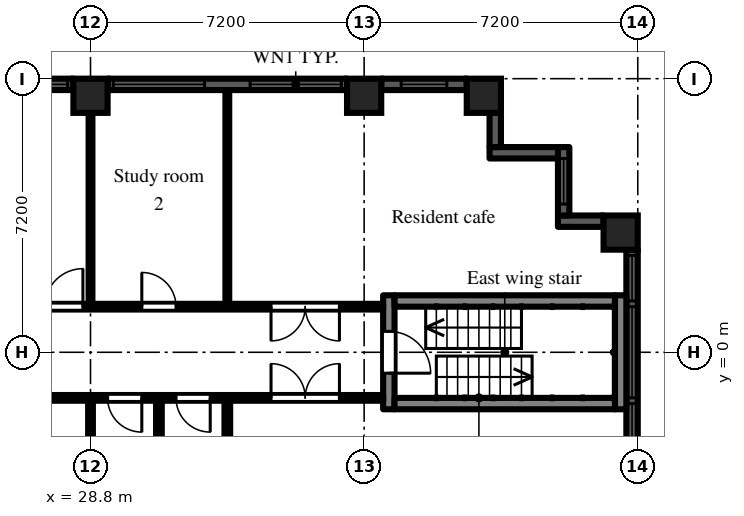
"""IFC4 building model, lengths in metres.
Left out: names, types, materials, properties, quantities, classifications, styles, units other than length and angle.
Written with IfcOpenShell. Run it as: python <this file> out.ifc"""

import sys

from ifc_helpers import new_model, si_unit, direction, frame, frame_2d, origin, origin_2d, place, context, subcontext, project, spatial, rectangle, extrude, element, fill, save


model = new_model("IFC4")
c1 = context("Model", 3, precision=1e-05, world=origin(), true_north=direction((0.0, 1.0)))
c2 = subcontext(c1, "Body", "Model", "MODEL_VIEW")
j1 = project(units=[si_unit("LENGTHUNIT", "METRE"), si_unit("PLANEANGLEUNIT", "RADIAN")], contexts=[c1])
p1 = place(None, origin())
s1 = spatial("IfcSite", under=j1, at=p1, CompositionType="ELEMENT")
p2 = place(p1, origin())
s2 = spatial("IfcBuilding", under=s1, at=p2, CompositionType="ELEMENT")
p3 = place(p2, frame((0.0, 0.0, 75.9)))
s3 = spatial("IfcBuildingStorey", under=s2, at=p3, CompositionType="ELEMENT", Elevation=75.9)
for number, where, z_axis, x_axis in (
    (1, (28.8, 6.75, 0.0), (0.0, 0.0, 1.0), (1.0, 0.0, 0.0)),
    (2, (36.0, 6.75, 0.0), (0.0, 0.0, 1.0), (1.0, 0.0, 0.0)),
    (3, (39.15, 6.75, 0.0), (0.0, 0.0, 1.0), (1.0, 0.0, 0.0)),
    (4, (42.75, 3.15, 0.0), (0.0, 0.0, 1.0), (1.0, 0.0, 0.0)),
):
    element("IfcColumn", number, at=place(p3, frame(where, z_axis=z_axis, x_axis=x_axis)), inside=s3, PredefinedType="COLUMN", context=c2, shape_type="SweptSolid", body=[
        extrude(rectangle(XDim=0.9, YDim=0.9, at=origin_2d()), origin(), (0.0, 0.0, 1.0), 3.0),
    ])
p4 = place(p3, frame((43.05, -2.7, 0.0), z_axis=(0.0, 0.0, 1.0), x_axis=(0.0, 1.0, 0.0)))
e5 = element("IfcWall", 5, at=p4, inside=s3, PredefinedType="SOLIDWALL", context=c2, shape_type="SweptSolid", body=[
    extrude(rectangle(XDim=5.4, YDim=0.3, at=frame_2d((2.7, 0.0))), origin(), (0.0, 0.0, 1.0), 2.1),
])
p5 = place(p4, frame((1.5, 0.0, 0.2)))
e6 = element("IfcOpeningElement", 6, at=p5, cuts=e5, PredefinedType="OPENING", context=c2, shape_type="SweptSolid", body=[
    extrude(rectangle(XDim=2.4, YDim=1.85, at=frame_2d((1.2, 0.925))), frame((0.0, 0.16, 0.0), z_axis=(0.0, -1.0, 0.0), x_axis=(1.0, 0.0, 0.0)), (0.0, 0.0, 1.0), 0.32),
])
p6 = place(p4, frame((0.15, 0.0, 0.2)))
e7 = element("IfcOpeningElement", 7, at=p6, cuts=e5, PredefinedType="OPENING", context=c2, shape_type="SweptSolid", body=[
    extrude(rectangle(XDim=1.2, YDim=1.85, at=frame_2d((0.6, 0.925))), frame((0.0, 0.16, 0.0), z_axis=(0.0, -1.0, 0.0), x_axis=(1.0, 0.0, 0.0)), (0.0, 0.0, 1.0), 0.32),
])
p7 = place(p4, frame((4.05, 0.0, 0.2)))
e8 = element("IfcOpeningElement", 8, at=p7, cuts=e5, PredefinedType="OPENING", context=c2, shape_type="SweptSolid", body=[
    extrude(rectangle(XDim=1.2, YDim=1.85, at=frame_2d((0.6, 0.925))), frame((0.0, 0.16, 0.0), z_axis=(0.0, -1.0, 0.0), x_axis=(1.0, 0.0, 0.0)), (0.0, 0.0, 1.0), 0.32),
])
p8 = place(p3, frame((42.3, 3.45, 0.0), z_axis=(0.0, 0.0, 1.0), x_axis=(-1.0, 0.0, 0.0)))
e9 = element("IfcWall", 9, at=p8, inside=s3, PredefinedType="SOLIDWALL", context=c2, shape_type="SweptSolid", body=[
    extrude(rectangle(XDim=1.2, YDim=0.3, at=frame_2d((0.6, 0.0))), origin(), (0.0, 0.0, 1.0), 2.575),
])
p9 = place(p3, frame((41.25, 3.6, 0.0), z_axis=(0.0, 0.0, 1.0), x_axis=(0.0, 1.0, 0.0)))
e10 = element("IfcWall", 10, at=p9, inside=s3, PredefinedType="SOLIDWALL", context=c2, shape_type="SweptSolid", body=[
    extrude(rectangle(XDim=1.8, YDim=0.3, at=frame_2d((0.9, 0.0))), origin(), (0.0, 0.0, 1.0), 2.575),
])
p10 = place(p9, frame((0.3, 0.0, 0.2)))
e11 = element("IfcOpeningElement", 11, at=p10, cuts=e10, PredefinedType="OPENING", context=c2, shape_type="SweptSolid", body=[
    extrude(rectangle(XDim=1.2, YDim=1.85, at=frame_2d((0.6, 0.925))), frame((0.0, 0.16, 0.0), z_axis=(0.0, -1.0, 0.0), x_axis=(1.0, 0.0, 0.0)), (0.0, 0.0, 1.0), 0.32),
])
p11 = place(p3, frame((41.1, 5.25, 0.0), z_axis=(0.0, 0.0, 1.0), x_axis=(-1.0, 0.0, 0.0)))
e12 = element("IfcWall", 12, at=p11, inside=s3, PredefinedType="SOLIDWALL", context=c2, shape_type="SweptSolid", body=[
    extrude(rectangle(XDim=1.8, YDim=0.3, at=frame_2d((0.9, 0.0))), origin(), (0.0, 0.0, 1.0), 2.575),
])
p12 = place(p3, frame((39.45, 5.4, 0.0), z_axis=(0.0, 0.0, 1.0), x_axis=(0.0, 1.0, 0.0)))
e13 = element("IfcWall", 13, at=p12, inside=s3, PredefinedType="SOLIDWALL", context=c2, shape_type="SweptSolid", body=[
    extrude(rectangle(XDim=0.9, YDim=0.3, at=frame_2d((0.45, 0.0))), origin(), (0.0, 0.0, 1.0), 2.575),
])
p13 = place(p3, frame((38.7, 7.05, 0.0), z_axis=(0.0, 0.0, 1.0), x_axis=(-1.0, 0.0, 0.0)))
e14 = element("IfcWall", 14, at=p13, inside=s3, PredefinedType="SOLIDWALL", context=c2, shape_type="SweptSolid", body=[
    extrude(rectangle(XDim=2.25, YDim=0.3, at=frame_2d((1.125, 0.0))), origin(), (0.0, 0.0, 1.0), 2.1),
])
p14 = place(p13, frame((0.525, 0.0, 0.2)))
e15 = element("IfcOpeningElement", 15, at=p14, cuts=e14, PredefinedType="OPENING", context=c2, shape_type="SweptSolid", body=[
    extrude(rectangle(XDim=1.2, YDim=1.85, at=frame_2d((0.6, 0.925))), frame((0.0, 0.16, 0.0), z_axis=(0.0, -1.0, 0.0), x_axis=(1.0, 0.0, 0.0)), (0.0, 0.0, 1.0), 0.32),
])
p15 = place(p3, frame((35.55, 7.05, 0.0), z_axis=(0.0, 0.0, 1.0), x_axis=(-1.0, 0.0, 0.0)))
e16 = element("IfcWall", 16, at=p15, inside=s3, PredefinedType="SOLIDWALL", context=c2, shape_type="SweptSolid", body=[
    extrude(rectangle(XDim=6.3, YDim=0.3, at=frame_2d((3.15, 0.0))), origin(), (0.0, 0.0, 1.0), 2.1),
])
p16 = place(p15, frame((0.15, 0.0, 0.2)))
e17 = element("IfcOpeningElement", 17, at=p16, cuts=e16, PredefinedType="OPENING", context=c2, shape_type="SweptSolid", body=[
    extrude(rectangle(XDim=2.4, YDim=1.85, at=frame_2d((1.2, 0.925))), frame((0.0, 0.16, 0.0), z_axis=(0.0, -1.0, 0.0), x_axis=(1.0, 0.0, 0.0)), (0.0, 0.0, 1.0), 0.32),
])
p17 = place(p15, frame((3.75, 0.0, 0.2)))
e18 = element("IfcOpeningElement", 18, at=p17, cuts=e16, PredefinedType="OPENING", context=c2, shape_type="SweptSolid", body=[
    extrude(rectangle(XDim=2.4, YDim=1.85, at=frame_2d((1.2, 0.925))), frame((0.0, 0.16, 0.0), z_axis=(0.0, -1.0, 0.0), x_axis=(1.0, 0.0, 0.0)), (0.0, 0.0, 1.0), 0.32),
])
p18 = place(p3, frame((28.35, 7.05, 0.0), z_axis=(0.0, 0.0, 1.0), x_axis=(-1.0, 0.0, 0.0)))
e19 = element("IfcWall", 19, at=p18, inside=s3, PredefinedType="SOLIDWALL", context=c2, shape_type="SweptSolid", body=[
    extrude(rectangle(XDim=3.15, YDim=0.3, at=frame_2d((1.575, 0.0))), origin(), (0.0, 0.0, 1.0), 2.1),
])
p19 = place(p18, frame((0.15, 0.0, 0.2)))
e20 = element("IfcOpeningElement", 20, at=p19, cuts=e19, PredefinedType="OPENING", context=c2, shape_type="SweptSolid", body=[
    extrude(rectangle(XDim=2.4, YDim=1.85, at=frame_2d((1.2, 0.925))), frame((0.0, 0.16, 0.0), z_axis=(0.0, -1.0, 0.0), x_axis=(1.0, 0.0, 0.0)), (0.0, 0.0, 1.0), 0.32),
])
p20 = place(p3, frame((36.65, -1.5, 0.0), z_axis=(0.0, 0.0, 1.0), x_axis=(0.0, 1.0, 0.0)))
e21 = element("IfcWall", 21, at=p20, inside=s3, PredefinedType="SHEAR", context=c2, shape_type="SweptSolid", body=[
    extrude(rectangle(XDim=3.0, YDim=0.3, at=frame_2d((1.5, 0.0))), origin(), (0.0, 0.0, 1.0), 2.575),
])
p21 = place(p20, frame((0.95, 0.0, 0.0)))
e22 = element("IfcOpeningElement", 22, at=p21, cuts=e21, PredefinedType="OPENING", context=c2, shape_type="SweptSolid", body=[
    extrude(rectangle(XDim=1.1, YDim=2.1, at=frame_2d((0.55, 1.05))), frame((0.0, 0.16, 0.0), z_axis=(0.0, -1.0, 0.0), x_axis=(1.0, 0.0, 0.0)), (0.0, 0.0, 1.0), 0.32),
])
p22 = place(p3, frame((42.75, -1.5, 0.0), z_axis=(0.0, 0.0, 1.0), x_axis=(0.0, 1.0, 0.0)))
e23 = element("IfcWall", 23, at=p22, inside=s3, PredefinedType="SHEAR", context=c2, shape_type="SweptSolid", body=[
    extrude(rectangle(XDim=3.0, YDim=0.3, at=frame_2d((1.5, 0.0))), origin(), (0.0, 0.0, 1.0), 2.575),
])
for number, where, z_axis, x_axis in (
    (24, (36.8, -1.35, 0.0), (0.0, 0.0, 1.0), (1.0, 0.0, 0.0)),
    (25, (36.8, 1.35, 0.0), (0.0, 0.0, 1.0), (1.0, 0.0, 0.0)),
):
    element("IfcWall", number, at=place(p3, frame(where, z_axis=z_axis, x_axis=x_axis)), inside=s3, PredefinedType="SHEAR", context=c2, shape_type="SweptSolid", body=[
        extrude(rectangle(XDim=5.8, YDim=0.3, at=frame_2d((2.9, 0.0))), origin(), (0.0, 0.0, 1.0), 2.575),
    ])
p23 = place(p3, frame((21.6, -1.2, 0.0), z_axis=(0.0, 0.0, 1.0), x_axis=(1.0, 0.0, 0.0)))
e26 = element("IfcWall", 26, at=p23, inside=s3, PredefinedType="PARTITIONING", context=c2, shape_type="SweptSolid", body=[
    extrude(rectangle(XDim=14.9, YDim=0.15, at=frame_2d((7.45, 0.0))), origin(), (0.0, 0.0, 1.0), 2.575),
])
p24 = place(p23, frame((0.45, 0.0, 0.0)))
e27 = element("IfcOpeningElement", 27, at=p24, cuts=e26, PredefinedType="OPENING", context=c2, shape_type="SweptSolid", body=[
    extrude(rectangle(XDim=0.9, YDim=2.1, at=frame_2d((0.45, 1.05))), frame((0.0, 0.085, 0.0), z_axis=(0.0, -1.0, 0.0), x_axis=(1.0, 0.0, 0.0)), (0.0, 0.0, 1.0), 0.17),
])
p25 = place(p23, frame((2.25, 0.0, 0.0)))
e28 = element("IfcOpeningElement", 28, at=p25, cuts=e26, PredefinedType="OPENING", context=c2, shape_type="SweptSolid", body=[
    extrude(rectangle(XDim=0.9, YDim=2.1, at=frame_2d((0.45, 1.05))), frame((0.0, 0.085, 0.0), z_axis=(0.0, -1.0, 0.0), x_axis=(1.0, 0.0, 0.0)), (0.0, 0.0, 1.0), 0.17),
])
p26 = place(p23, frame((4.95, 0.0, 0.0)))
e29 = element("IfcOpeningElement", 29, at=p26, cuts=e26, PredefinedType="OPENING", context=c2, shape_type="SweptSolid", body=[
    extrude(rectangle(XDim=0.9, YDim=2.1, at=frame_2d((0.45, 1.05))), frame((0.0, 0.085, 0.0), z_axis=(0.0, -1.0, 0.0), x_axis=(1.0, 0.0, 0.0)), (0.0, 0.0, 1.0), 0.17),
])
p27 = place(p23, frame((7.65, 0.0, 0.0)))
e30 = element("IfcOpeningElement", 30, at=p27, cuts=e26, PredefinedType="OPENING", context=c2, shape_type="SweptSolid", body=[
    extrude(rectangle(XDim=0.9, YDim=2.1, at=frame_2d((0.45, 1.05))), frame((0.0, 0.085, 0.0), z_axis=(0.0, -1.0, 0.0), x_axis=(1.0, 0.0, 0.0)), (0.0, 0.0, 1.0), 0.17),
])
p28 = place(p23, frame((9.45, 0.0, 0.0)))
e31 = element("IfcOpeningElement", 31, at=p28, cuts=e26, PredefinedType="OPENING", context=c2, shape_type="SweptSolid", body=[
    extrude(rectangle(XDim=0.9, YDim=2.1, at=frame_2d((0.45, 1.05))), frame((0.0, 0.085, 0.0), z_axis=(0.0, -1.0, 0.0), x_axis=(1.0, 0.0, 0.0)), (0.0, 0.0, 1.0), 0.17),
])
p29 = place(p23, frame((11.95, 0.0, 0.0)))
e32 = element("IfcOpeningElement", 32, at=p29, cuts=e26, PredefinedType="OPENING", context=c2, shape_type="SweptSolid", body=[
    extrude(rectangle(XDim=1.8, YDim=2.1, at=frame_2d((0.9, 1.05))), frame((0.0, 0.085, 0.0), z_axis=(0.0, -1.0, 0.0), x_axis=(1.0, 0.0, 0.0)), (0.0, 0.0, 1.0), 0.17),
])
p30 = place(p3, frame((21.6, 1.2, 0.0), z_axis=(0.0, 0.0, 1.0), x_axis=(1.0, 0.0, 0.0)))
e33 = element("IfcWall", 33, at=p30, inside=s3, PredefinedType="PARTITIONING", context=c2, shape_type="SweptSolid", body=[
    extrude(rectangle(XDim=14.9, YDim=0.15, at=frame_2d((7.45, 0.0))), origin(), (0.0, 0.0, 1.0), 2.575),
])
p31 = place(p30, frame((0.45, 0.0, 0.0)))
e34 = element("IfcOpeningElement", 34, at=p31, cuts=e33, PredefinedType="OPENING", context=c2, shape_type="SweptSolid", body=[
    extrude(rectangle(XDim=0.9, YDim=2.1, at=frame_2d((0.45, 1.05))), frame((0.0, 0.085, 0.0), z_axis=(0.0, -1.0, 0.0), x_axis=(1.0, 0.0, 0.0)), (0.0, 0.0, 1.0), 0.17),
])
p32 = place(p30, frame((2.25, 0.0, 0.0)))
e35 = element("IfcOpeningElement", 35, at=p32, cuts=e33, PredefinedType="OPENING", context=c2, shape_type="SweptSolid", body=[
    extrude(rectangle(XDim=0.9, YDim=2.1, at=frame_2d((0.45, 1.05))), frame((0.0, 0.085, 0.0), z_axis=(0.0, -1.0, 0.0), x_axis=(1.0, 0.0, 0.0)), (0.0, 0.0, 1.0), 0.17),
])
p33 = place(p30, frame((6.0, 0.0, 0.0)))
e36 = element("IfcOpeningElement", 36, at=p33, cuts=e33, PredefinedType="OPENING", context=c2, shape_type="SweptSolid", body=[
    extrude(rectangle(XDim=1.0, YDim=2.1, at=frame_2d((0.5, 1.05))), frame((0.0, 0.085, 0.0), z_axis=(0.0, -1.0, 0.0), x_axis=(1.0, 0.0, 0.0)), (0.0, 0.0, 1.0), 0.17),
])
p34 = place(p30, frame((8.55, 0.0, 0.0)))
e37 = element("IfcOpeningElement", 37, at=p34, cuts=e33, PredefinedType="OPENING", context=c2, shape_type="SweptSolid", body=[
    extrude(rectangle(XDim=0.9, YDim=2.1, at=frame_2d((0.45, 1.05))), frame((0.0, 0.085, 0.0), z_axis=(0.0, -1.0, 0.0), x_axis=(1.0, 0.0, 0.0)), (0.0, 0.0, 1.0), 0.17),
])
p35 = place(p30, frame((11.95, 0.0, 0.0)))
e38 = element("IfcOpeningElement", 38, at=p35, cuts=e33, PredefinedType="OPENING", context=c2, shape_type="SweptSolid", body=[
    extrude(rectangle(XDim=1.8, YDim=2.1, at=frame_2d((0.9, 1.05))), frame((0.0, 0.085, 0.0), z_axis=(0.0, -1.0, 0.0), x_axis=(1.0, 0.0, 0.0)), (0.0, 0.0, 1.0), 0.17),
])
p36 = place(p3, frame((28.8, -6.9, 0.0), z_axis=(0.0, 0.0, 1.0), x_axis=(0.0, 1.0, 0.0)))
e39 = element("IfcWall", 39, at=p36, inside=s3, PredefinedType="PARTITIONING", context=c2, shape_type="SweptSolid", body=[
    extrude(rectangle(XDim=5.625, YDim=0.125, at=frame_2d((2.812, 0.0))), origin(), (0.0, 0.0, 1.0), 2.575),
])
p37 = place(p3, frame((28.8, 1.275, 0.0), z_axis=(0.0, 0.0, 1.0), x_axis=(0.0, 1.0, 0.0)))
e40 = element("IfcWall", 40, at=p37, inside=s3, PredefinedType="PARTITIONING", context=c2, shape_type="SweptSolid", body=[
    extrude(rectangle(XDim=5.625, YDim=0.1, at=frame_2d((2.812, 0.0))), origin(), (0.0, 0.0, 1.0), 2.575),
])
for number, where, z_axis, x_axis in (
    (41, (30.6, -6.9, 0.0), (0.0, 0.0, 1.0), (0.0, 1.0, 0.0)),
    (42, (32.4, -6.9, 0.0), (0.0, 0.0, 1.0), (0.0, 1.0, 0.0)),
):
    element("IfcWall", number, at=place(p3, frame(where, z_axis=z_axis, x_axis=x_axis)), inside=s3, PredefinedType="PARTITIONING", context=c2, shape_type="SweptSolid", body=[
        extrude(rectangle(XDim=5.625, YDim=0.15, at=frame_2d((2.812, 0.0))), origin(), (0.0, 0.0, 1.0), 2.575),
    ])
p38 = place(p3, frame((32.4, 1.275, 0.0), z_axis=(0.0, 0.0, 1.0), x_axis=(0.0, 1.0, 0.0)))
e43 = element("IfcWall", 43, at=p38, inside=s3, PredefinedType="PARTITIONING", context=c2, shape_type="SweptSolid", body=[
    extrude(rectangle(XDim=5.625, YDim=0.1, at=frame_2d((2.812, 0.0))), origin(), (0.0, 0.0, 1.0), 2.575),
])
p39 = place(p5, origin())
e44 = element("IfcWindow", 44, at=p39, inside=s3, PartitioningType="SINGLE_PANEL", PredefinedType="WINDOW", context=c2, shape_type="SweptSolid", body=[
    extrude(rectangle(XDim=2.4, YDim=1.85, at=frame_2d((1.2, 0.925))), frame((0.0, 0.03, 0.0), z_axis=(0.0, -1.0, 0.0), x_axis=(1.0, 0.0, 0.0)), (0.0, 0.0, 1.0), 0.06),
])
fill(e6, e44)
p40 = place(p6, origin())
e45 = element("IfcWindow", 45, at=p40, inside=s3, PartitioningType="SINGLE_PANEL", PredefinedType="WINDOW", context=c2, shape_type="SweptSolid", body=[
    extrude(rectangle(XDim=1.2, YDim=1.85, at=frame_2d((0.6, 0.925))), frame((0.0, 0.03, 0.0), z_axis=(0.0, -1.0, 0.0), x_axis=(1.0, 0.0, 0.0)), (0.0, 0.0, 1.0), 0.06),
])
fill(e7, e45)
p41 = place(p7, origin())
e46 = element("IfcWindow", 46, at=p41, inside=s3, PartitioningType="SINGLE_PANEL", PredefinedType="WINDOW", context=c2, shape_type="SweptSolid", body=[
    extrude(rectangle(XDim=1.2, YDim=1.85, at=frame_2d((0.6, 0.925))), frame((0.0, 0.03, 0.0), z_axis=(0.0, -1.0, 0.0), x_axis=(1.0, 0.0, 0.0)), (0.0, 0.0, 1.0), 0.06),
])
fill(e8, e46)
p42 = place(p10, origin())
e47 = element("IfcWindow", 47, at=p42, inside=s3, PartitioningType="SINGLE_PANEL", PredefinedType="WINDOW", context=c2, shape_type="SweptSolid", body=[
    extrude(rectangle(XDim=1.2, YDim=1.85, at=frame_2d((0.6, 0.925))), frame((0.0, 0.03, 0.0), z_axis=(0.0, -1.0, 0.0), x_axis=(1.0, 0.0, 0.0)), (0.0, 0.0, 1.0), 0.06),
])
fill(e11, e47)
p43 = place(p14, origin())
e48 = element("IfcWindow", 48, at=p43, inside=s3, PartitioningType="SINGLE_PANEL", PredefinedType="WINDOW", context=c2, shape_type="SweptSolid", body=[
    extrude(rectangle(XDim=1.2, YDim=1.85, at=frame_2d((0.6, 0.925))), frame((0.0, 0.03, 0.0), z_axis=(0.0, -1.0, 0.0), x_axis=(1.0, 0.0, 0.0)), (0.0, 0.0, 1.0), 0.06),
])
fill(e15, e48)
p44 = place(p16, origin())
e49 = element("IfcWindow", 49, at=p44, inside=s3, PartitioningType="SINGLE_PANEL", PredefinedType="WINDOW", context=c2, shape_type="SweptSolid", body=[
    extrude(rectangle(XDim=2.4, YDim=1.85, at=frame_2d((1.2, 0.925))), frame((0.0, 0.03, 0.0), z_axis=(0.0, -1.0, 0.0), x_axis=(1.0, 0.0, 0.0)), (0.0, 0.0, 1.0), 0.06),
])
fill(e17, e49)
p45 = place(p17, origin())
e50 = element("IfcWindow", 50, at=p45, inside=s3, PartitioningType="SINGLE_PANEL", PredefinedType="WINDOW", context=c2, shape_type="SweptSolid", body=[
    extrude(rectangle(XDim=2.4, YDim=1.85, at=frame_2d((1.2, 0.925))), frame((0.0, 0.03, 0.0), z_axis=(0.0, -1.0, 0.0), x_axis=(1.0, 0.0, 0.0)), (0.0, 0.0, 1.0), 0.06),
])
fill(e18, e50)
p46 = place(p19, origin())
e51 = element("IfcWindow", 51, at=p46, inside=s3, PartitioningType="SINGLE_PANEL", PredefinedType="WINDOW", context=c2, shape_type="SweptSolid", body=[
    extrude(rectangle(XDim=2.4, YDim=1.85, at=frame_2d((1.2, 0.925))), frame((0.0, 0.03, 0.0), z_axis=(0.0, -1.0, 0.0), x_axis=(1.0, 0.0, 0.0)), (0.0, 0.0, 1.0), 0.06),
])
fill(e20, e51)
p47 = place(p21, frame((1.1, 0.0, 0.0), z_axis=(0.0, 0.0, 1.0), x_axis=(-1.0, 0.0, 0.0)))
e52 = element("IfcDoor", 52, at=p47, inside=s3, OperationType="SINGLE_SWING_RIGHT", PredefinedType="DOOR", context=c2, shape_type="SweptSolid", body=[
    extrude(rectangle(XDim=1.1, YDim=2.1, at=frame_2d((0.55, 1.05))), frame((0.0, 0.025, 0.0), z_axis=(0.0, -1.0, 0.0), x_axis=(1.0, 0.0, 0.0)), (0.0, 0.0, 1.0), 0.05),
])
fill(e22, e52)
p48 = place(p33, origin())
e53 = element("IfcDoor", 53, at=p48, inside=s3, OperationType="SINGLE_SWING_RIGHT", PredefinedType="DOOR", context=c2, shape_type="SweptSolid", body=[
    extrude(rectangle(XDim=1.0, YDim=2.1, at=frame_2d((0.5, 1.05))), frame((0.0, 0.025, 0.0), z_axis=(0.0, -1.0, 0.0), x_axis=(1.0, 0.0, 0.0)), (0.0, 0.0, 1.0), 0.05),
])
fill(e36, e53)
p49 = place(p34, origin())
e54 = element("IfcDoor", 54, at=p49, inside=s3, OperationType="SINGLE_SWING_LEFT", PredefinedType="DOOR", context=c2, shape_type="SweptSolid", body=[
    extrude(rectangle(XDim=0.9, YDim=2.1, at=frame_2d((0.45, 1.05))), frame((0.0, 0.025, 0.0), z_axis=(0.0, -1.0, 0.0), x_axis=(1.0, 0.0, 0.0)), (0.0, 0.0, 1.0), 0.05),
])
fill(e37, e54)
p50 = place(p35, frame((1.8, 0.0, 0.0), z_axis=(0.0, 0.0, 1.0), x_axis=(-1.0, 0.0, 0.0)))
e55 = element("IfcDoor", 55, at=p50, inside=s3, OperationType="DOUBLE_DOOR_DOUBLE_SWING", PredefinedType="DOOR", context=c2, shape_type="SweptSolid", body=[
    extrude(rectangle(XDim=1.8, YDim=2.1, at=frame_2d((0.9, 1.05))), frame((0.0, 0.025, 0.0), z_axis=(0.0, -1.0, 0.0), x_axis=(1.0, 0.0, 0.0)), (0.0, 0.0, 1.0), 0.05),
])
fill(e38, e55)
p51 = place(p27, frame((0.9, 0.0, 0.0), z_axis=(0.0, 0.0, 1.0), x_axis=(-1.0, 0.0, 0.0)))
e56 = element("IfcDoor", 56, at=p51, inside=s3, OperationType="SINGLE_SWING_LEFT", PredefinedType="DOOR", context=c2, shape_type="SweptSolid", body=[
    extrude(rectangle(XDim=0.9, YDim=2.1, at=frame_2d((0.45, 1.05))), frame((0.0, 0.025, 0.0), z_axis=(0.0, -1.0, 0.0), x_axis=(1.0, 0.0, 0.0)), (0.0, 0.0, 1.0), 0.05),
])
fill(e30, e56)
p52 = place(p28, frame((0.9, 0.0, 0.0), z_axis=(0.0, 0.0, 1.0), x_axis=(-1.0, 0.0, 0.0)))
e57 = element("IfcDoor", 57, at=p52, inside=s3, OperationType="SINGLE_SWING_LEFT", PredefinedType="DOOR", context=c2, shape_type="SweptSolid", body=[
    extrude(rectangle(XDim=0.9, YDim=2.1, at=frame_2d((0.45, 1.05))), frame((0.0, 0.025, 0.0), z_axis=(0.0, -1.0, 0.0), x_axis=(1.0, 0.0, 0.0)), (0.0, 0.0, 1.0), 0.05),
])
fill(e31, e57)
p53 = place(p29, origin())
e58 = element("IfcDoor", 58, at=p53, inside=s3, OperationType="DOUBLE_DOOR_DOUBLE_SWING", PredefinedType="DOOR", context=c2, shape_type="SweptSolid", body=[
    extrude(rectangle(XDim=1.8, YDim=2.1, at=frame_2d((0.9, 1.05))), frame((0.0, 0.025, 0.0), z_axis=(0.0, -1.0, 0.0), x_axis=(1.0, 0.0, 0.0)), (0.0, 0.0, 1.0), 0.05),
])
fill(e32, e58)
save(model, sys.argv[1])
